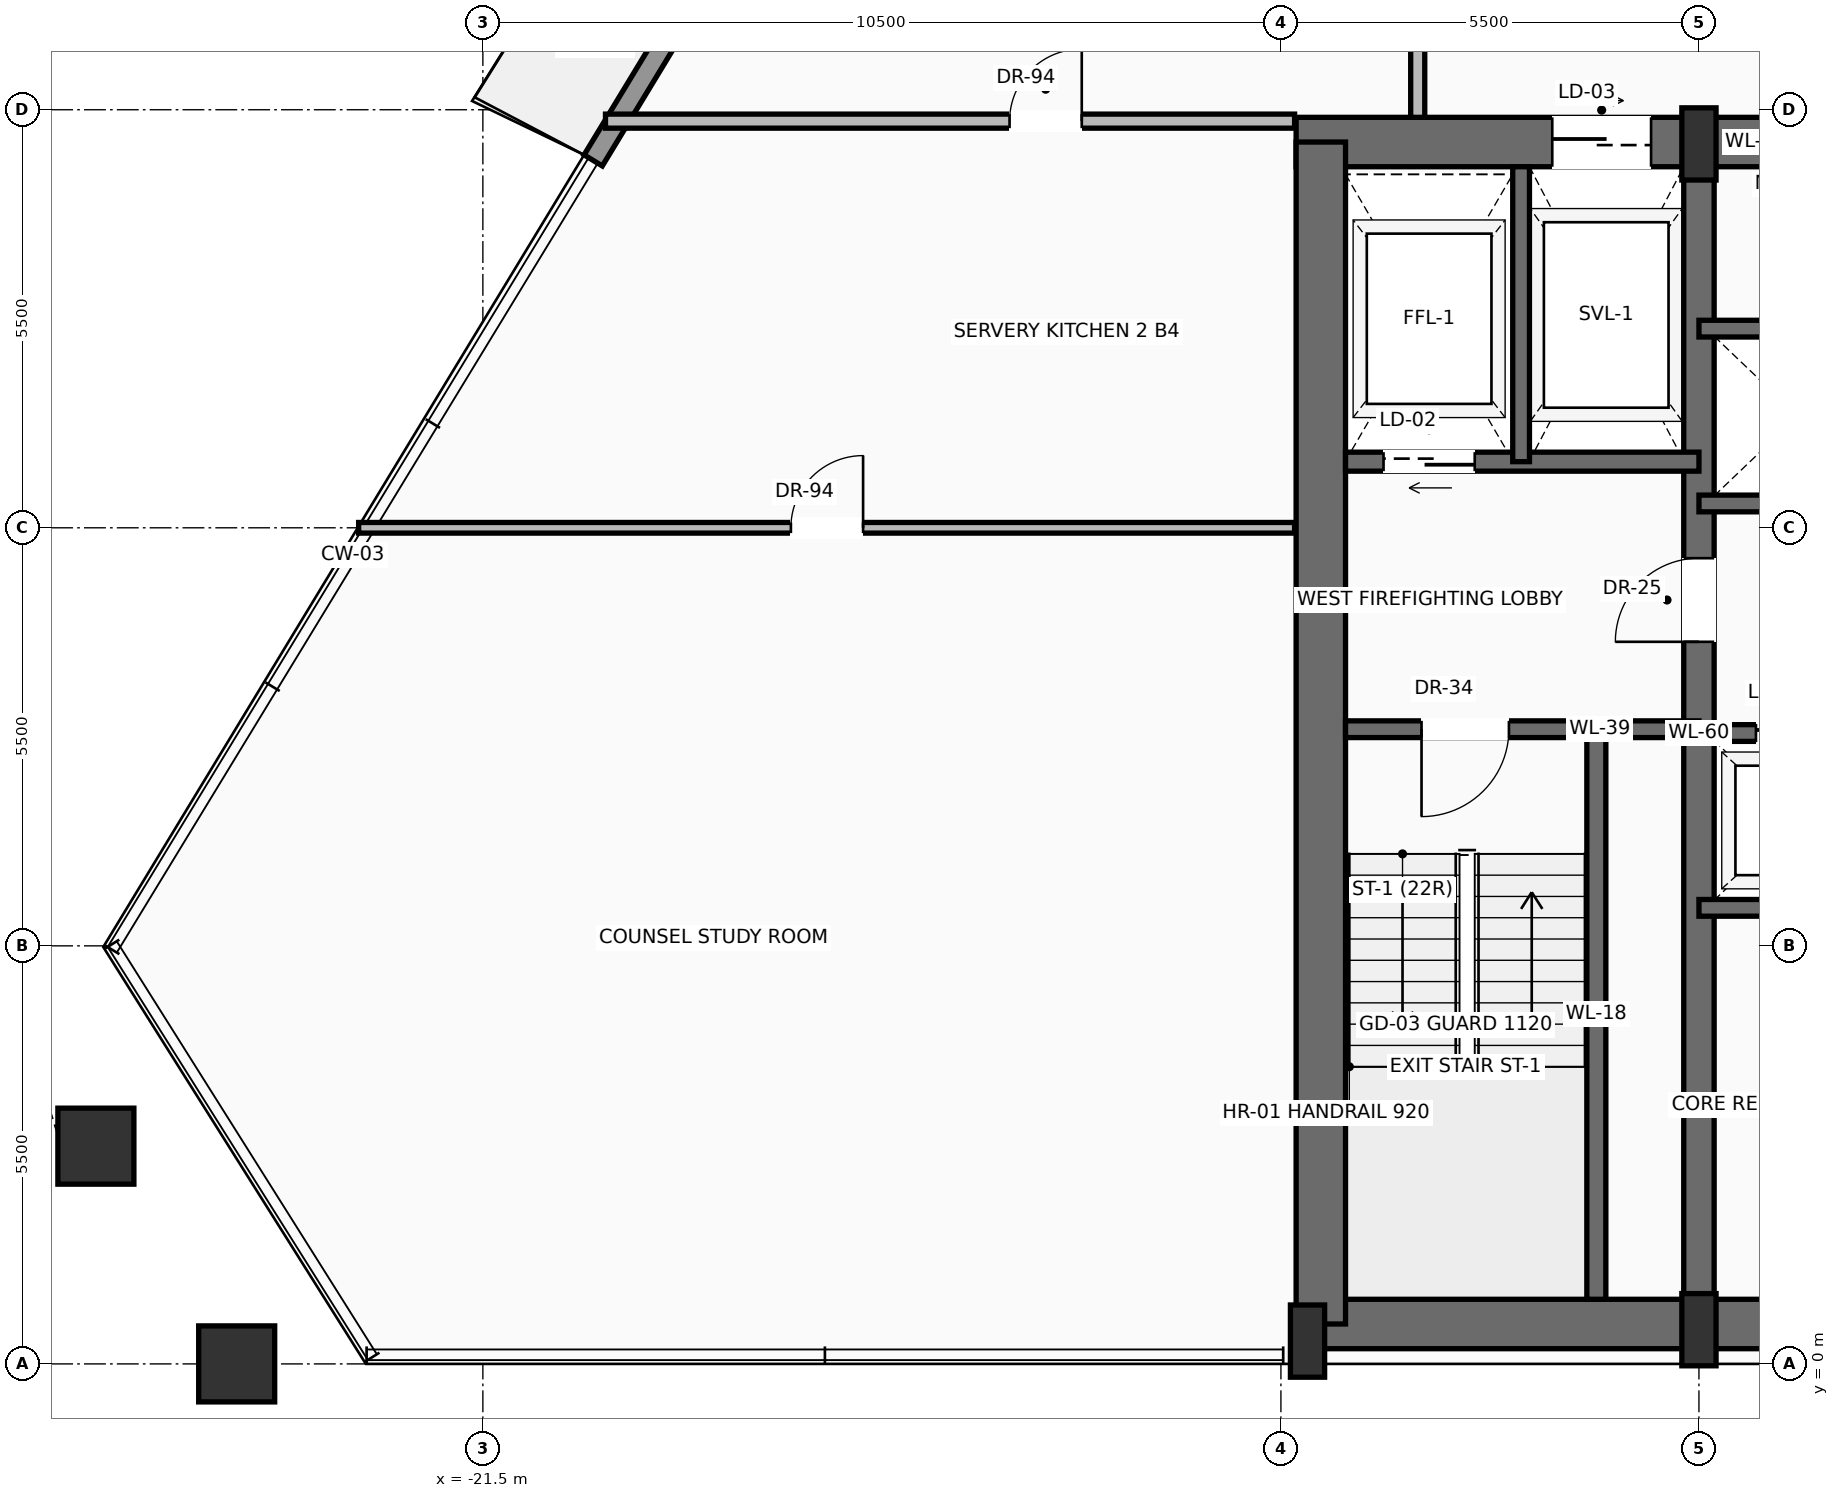
"""IFC4 building model, lengths in metres.
Left out: names, types, materials, properties, quantities, classifications, styles, units other than length and angle.
Written with IfcOpenShell. Run it as: python <this file> out.ifc"""

import sys

from ifc_helpers import new_model, si_unit, direction, frame, frame_2d, origin, origin_2d, place, context, subcontext, project, spatial, rectangle, hollow_rectangle, extrude, source, transform, mapped, element, fill, save


model = new_model("IFC4")
c1 = context("Model", 3, precision=1e-05, world=origin(), true_north=direction((0.0, 1.0)))
c2 = subcontext(c1, "Body", "Model", "MODEL_VIEW")
j1 = project(units=[si_unit("LENGTHUNIT", "METRE"), si_unit("PLANEANGLEUNIT", "RADIAN")], contexts=[c1])
p1 = place(None, origin())
s1 = spatial("IfcSite", under=j1, at=p1, CompositionType="ELEMENT")
p2 = place(p1, origin())
s2 = spatial("IfcBuilding", under=s1, at=p2, CompositionType="ELEMENT")
p3 = place(p2, frame((0.0, 0.0, 208.0)))
s3 = spatial("IfcBuildingStorey", under=s2, at=p3, CompositionType="ELEMENT", Elevation=208.0)
p4 = place(p3, frame((-10.65, 0.525, 0.0), z_axis=(0.0, 0.0, 1.0), x_axis=(1.0, 0.0, 0.0)))
e1 = element("IfcWall", 1, at=p4, inside=s3, PredefinedType="SHEAR", context=c2, shape_type="SweptSolid", body=[
    extrude(rectangle(XDim=21.3, YDim=0.65, at=frame_2d((10.65, 0.0))), origin(), (0.0, 0.0, 1.0), 3.47),
])
p5 = place(p3, frame((-10.8, 16.075, 0.0), z_axis=(0.0, 0.0, 1.0), x_axis=(1.0, 0.0, 0.0)))
e2 = element("IfcWall", 2, at=p5, inside=s3, PredefinedType="SHEAR", context=c2, shape_type="SweptSolid", body=[
    extrude(rectangle(XDim=21.6, YDim=0.65, at=frame_2d((10.8, 0.0))), origin(), (0.0, 0.0, 1.0), 3.47),
])
p6 = place(p5, frame((3.37, 0.0, 0.0)))
e3 = element("IfcOpeningElement", 3, at=p6, cuts=e2, PredefinedType="OPENING", context=c2, shape_type="SweptSolid", body=[
    extrude(rectangle(XDim=1.3, YDim=2.3, at=frame_2d((0.65, 1.15))), frame((0.0, 0.335, 0.0), z_axis=(0.0, -1.0, 0.0), x_axis=(1.0, 0.0, 0.0)), (0.0, 0.0, 1.0), 0.67),
])
p7 = place(p5, frame((9.8, 0.0, 0.0)))
e4 = element("IfcOpeningElement", 4, at=p7, cuts=e2, PredefinedType="OPENING", context=c2, shape_type="SweptSolid", body=[
    extrude(rectangle(XDim=2.0, YDim=2.4, at=frame_2d((1.0, 1.2))), frame((0.0, 0.335, 0.0), z_axis=(0.0, -1.0, 0.0), x_axis=(1.0, 0.0, 0.0)), (0.0, 0.0, 1.0), 0.67),
])
p8 = place(p3, frame((-10.475, 0.525, 0.0), z_axis=(0.0, 0.0, 1.0), x_axis=(0.0, 1.0, 0.0)))
e5 = element("IfcWall", 5, at=p8, inside=s3, PredefinedType="SHEAR", context=c2, shape_type="SweptSolid", body=[
    extrude(rectangle(XDim=15.55, YDim=0.65, at=frame_2d((7.775, 0.0))), origin(), (0.0, 0.0, 1.0), 3.47),
])
p9 = place(p3, frame((-5.5, 0.525, 0.0), z_axis=(0.0, 0.0, 1.0), x_axis=(0.0, 1.0, 0.0)))
e6 = element("IfcWall", 6, at=p9, inside=s3, PredefinedType="SHEAR", context=c2, shape_type="SweptSolid", body=[
    extrude(rectangle(XDim=15.55, YDim=0.4, at=frame_2d((7.775, 0.0))), origin(), (0.0, 0.0, 1.0), 3.47),
])
p10 = place(p9, frame((8.975, 0.0, 0.0)))
e7 = element("IfcOpeningElement", 7, at=p10, cuts=e6, PredefinedType="OPENING", context=c2, shape_type="SweptSolid", body=[
    extrude(rectangle(XDim=1.1, YDim=2.2, at=frame_2d((0.55, 1.1))), frame((0.0, 0.21, 0.0), z_axis=(0.0, -1.0, 0.0), x_axis=(1.0, 0.0, 0.0)), (0.0, 0.0, 1.0), 0.42),
])
m1 = source(origin(), c2, "Body", "SweptSolid", [
    extrude(rectangle(XDim=0.45, YDim=0.95, at=origin_2d()), origin(), (0.0, 0.0, 1.0), 3.7),
])
for number, where, z_axis, x_axis in (
    (8, (-10.65, 0.3, 0.0), (0.0, 0.0, 1.0), (1.0, 0.0, 0.0)),
    (9, (-5.5, 0.45, 0.0), (0.0, 0.0, 1.0), (1.0, 0.0, 0.0)),
    (10, (-5.5, 16.05, 0.0), (0.0, 0.0, 1.0), (1.0, 0.0, 0.0)),
):
    element("IfcColumn", number, at=place(p3, frame(where, z_axis=z_axis, x_axis=x_axis)), inside=s3, PredefinedType="PILASTER", context=c2, shape_type="MappedRepresentation", body=[
        mapped(m1, transform((0.0, 0.0, 0.0), scale=1.0)),
    ])
m2 = source(origin(), c2, "Body", "SweptSolid", [
    extrude(hollow_rectangle(XDim=1.0, YDim=1.0, WallThickness=0.05, at=origin_2d()), origin(), (0.0, 0.0, 1.0), 3.691),
])
p11 = place(p3, frame((-24.739, 0.0, 0.004), z_axis=(-0.006481774014, 0.0, 0.999978993082), x_axis=(0.0, -1.0, 0.0)))
e11 = element("IfcColumn", 11, at=p11, inside=s3, PredefinedType="COLUMN", context=c2, shape_type="MappedRepresentation", body=[
    mapped(m2, transform((0.0, 0.0, 0.0), scale=1.0)),
])
m3 = source(origin(), c2, "Body", "SweptSolid", [
    extrude(hollow_rectangle(XDim=1.0, YDim=1.0, WallThickness=0.05, at=origin_2d()), origin(), (0.0, 0.0, 1.0), 3.692),
])
p12 = place(p3, frame((-26.592, 2.865, 0.004), z_axis=(0.005951713196, -0.017921269733, 0.999821686703), x_axis=(0.949032912976, 0.315176982169, 0.0)))
e12 = element("IfcColumn", 12, at=p12, inside=s3, PredefinedType="COLUMN", context=c2, shape_type="MappedRepresentation", body=[
    mapped(m3, transform((0.0, 0.0, 0.0), scale=1.0)),
])
p13 = place(p3, frame((-20.048, 15.833, 0.0), z_axis=(0.0, 0.0, 1.0), x_axis=(0.518922930311, 0.854821029455, 0.0)))
e13 = element("IfcWall", 13, at=p13, inside=s3, PredefinedType="SOLIDWALL", context=c2, shape_type="SweptSolid", body=[
    extrude(rectangle(XDim=19.158, YDim=0.28, at=frame_2d((9.579, 0.0))), origin(), (0.0, 0.0, 1.0), 3.05),
])
p14 = place(p13, frame((4.598, 0.0, 0.0)))
e14 = element("IfcOpeningElement", 14, at=p14, cuts=e13, PredefinedType="OPENING", context=c2, shape_type="SweptSolid", body=[
    extrude(rectangle(XDim=1.6, YDim=2.35, at=frame_2d((0.8, 1.175))), frame((0.0, 0.15, 0.0), z_axis=(0.0, -1.0, 0.0), x_axis=(1.0, 0.0, 0.0)), (0.0, 0.0, 1.0), 0.3),
])
p15 = place(p13, frame((13.027, 0.0, 0.9)))
e15 = element("IfcOpeningElement", 15, at=p15, cuts=e13, PredefinedType="OPENING", context=c2, shape_type="SweptSolid", body=[
    extrude(rectangle(XDim=1.55, YDim=1.85, at=frame_2d((0.775, 0.925))), frame((0.0, 0.15, 0.0), z_axis=(0.0, -1.0, 0.0), x_axis=(1.0, 0.0, 0.0)), (0.0, 0.0, 1.0), 0.3),
])
p16 = place(p3, frame((-6.85, 0.85, 0.0), z_axis=(0.0, 0.0, 1.0), x_axis=(0.0, 1.0, 0.0)))
e16 = element("IfcWall", 16, at=p16, inside=s3, PredefinedType="SOLIDWALL", context=c2, shape_type="SweptSolid", body=[
    extrude(rectangle(XDim=7.5, YDim=0.25, at=frame_2d((3.75, 0.0))), origin(), (0.0, 0.0, 1.0), 3.47),
])
p17 = place(p3, frame((-5.5, 8.35, 0.0), z_axis=(0.0, 0.0, 1.0), x_axis=(-1.0, 0.0, 0.0)))
e17 = element("IfcWall", 17, at=p17, inside=s3, PredefinedType="SOLIDWALL", context=c2, shape_type="SweptSolid", body=[
    extrude(rectangle(XDim=4.65, YDim=0.22, at=frame_2d((2.325, 0.0))), origin(), (0.0, 0.0, 1.0), 3.47),
])
p18 = place(p17, frame((2.5, 0.0, 0.0)))
e18 = element("IfcOpeningElement", 18, at=p18, cuts=e17, PredefinedType="OPENING", context=c2, shape_type="SweptSolid", body=[
    extrude(rectangle(XDim=1.15, YDim=2.2, at=frame_2d((0.575, 1.1))), frame((0.0, 0.12, 0.0), z_axis=(0.0, -1.0, 0.0), x_axis=(1.0, 0.0, 0.0)), (0.0, 0.0, 1.0), 0.24),
])
p19 = place(p3, frame((-5.5, 11.87, 0.0), z_axis=(0.0, 0.0, 1.0), x_axis=(-1.0, 0.0, 0.0)))
e19 = element("IfcWall", 19, at=p19, inside=s3, PredefinedType="SOLIDWALL", context=c2, shape_type="SweptSolid", body=[
    extrude(rectangle(XDim=4.65, YDim=0.25, at=frame_2d((2.325, 0.0))), origin(), (0.0, 0.0, 1.0), 3.47),
])
p20 = place(p19, frame((2.95, 0.0, 0.0)))
e20 = element("IfcOpeningElement", 20, at=p20, cuts=e19, PredefinedType="OPENING", context=c2, shape_type="SweptSolid", body=[
    extrude(rectangle(XDim=1.2, YDim=2.25, at=frame_2d((0.6, 1.125))), frame((0.0, 0.135, 0.0), z_axis=(0.0, -1.0, 0.0), x_axis=(1.0, 0.0, 0.0)), (0.0, 0.0, 1.0), 0.27),
])
p21 = place(p3, frame((-7.84, 11.87, 0.0), z_axis=(0.0, 0.0, 1.0), x_axis=(0.0, 1.0, 0.0)))
e21 = element("IfcWall", 21, at=p21, inside=s3, PredefinedType="SOLIDWALL", context=c2, shape_type="SweptSolid", body=[
    extrude(rectangle(XDim=3.88, YDim=0.22, at=frame_2d((1.94, 0.0))), origin(), (0.0, 0.0, 1.0), 3.47),
])
p22 = place(p3, frame((-5.5, 6.0, 0.0), z_axis=(0.0, 0.0, 1.0), x_axis=(1.0, 0.0, 0.0)))
e22 = element("IfcWall", 22, at=p22, inside=s3, PredefinedType="SOLIDWALL", context=c2, shape_type="SweptSolid", body=[
    extrude(rectangle(XDim=7.32, YDim=0.22, at=frame_2d((3.66, 0.0))), origin(), (0.0, 0.0, 1.0), 3.47),
])
p23 = place(p3, frame((-5.5, 8.3, 0.0), z_axis=(0.0, 0.0, 1.0), x_axis=(1.0, 0.0, 0.0)))
e23 = element("IfcWall", 23, at=p23, inside=s3, PredefinedType="SOLIDWALL", context=c2, shape_type="SweptSolid", body=[
    extrude(rectangle(XDim=7.32, YDim=0.22, at=frame_2d((3.66, 0.0))), origin(), (0.0, 0.0, 1.0), 3.47),
])
p24 = place(p23, frame((0.75, 0.0, 0.0)))
e24 = element("IfcOpeningElement", 24, at=p24, cuts=e23, PredefinedType="OPENING", context=c2, shape_type="SweptSolid", body=[
    extrude(rectangle(XDim=1.1, YDim=2.2, at=frame_2d((0.55, 1.1))), frame((0.0, 0.12, 0.0), z_axis=(0.0, -1.0, 0.0), x_axis=(1.0, 0.0, 0.0)), (0.0, 0.0, 1.0), 0.24),
])
p25 = place(p23, frame((3.15, 0.0, 0.0)))
e25 = element("IfcOpeningElement", 25, at=p25, cuts=e23, PredefinedType="OPENING", context=c2, shape_type="SweptSolid", body=[
    extrude(rectangle(XDim=1.1, YDim=2.2, at=frame_2d((0.55, 1.1))), frame((0.0, 0.12, 0.0), z_axis=(0.0, -1.0, 0.0), x_axis=(1.0, 0.0, 0.0)), (0.0, 0.0, 1.0), 0.24),
])
p26 = place(p23, frame((5.55, 0.0, 0.0)))
e26 = element("IfcOpeningElement", 26, at=p26, cuts=e23, PredefinedType="OPENING", context=c2, shape_type="SweptSolid", body=[
    extrude(rectangle(XDim=1.1, YDim=2.2, at=frame_2d((0.55, 1.1))), frame((0.0, 0.12, 0.0), z_axis=(0.0, -1.0, 0.0), x_axis=(1.0, 0.0, 0.0)), (0.0, 0.0, 1.0), 0.24),
])
for number, where, z_axis, x_axis in (
    (27, (-5.5, 11.32, 0.0), (0.0, 0.0, 1.0), (1.0, 0.0, 0.0)),
    (28, (-5.5, 13.62, 0.0), (0.0, 0.0, 1.0), (1.0, 0.0, 0.0)),
):
    element("IfcWall", number, at=place(p3, frame(where, z_axis=z_axis, x_axis=x_axis)), inside=s3, PredefinedType="SOLIDWALL", context=c2, shape_type="SweptSolid", body=[
        extrude(rectangle(XDim=7.32, YDim=0.22, at=frame_2d((3.66, 0.0))), origin(), (0.0, 0.0, 1.0), 3.47),
    ])
p27 = place(p3, frame((-9.2, 16.4, 0.0), z_axis=(0.0, 0.0, 1.0), x_axis=(0.0, 1.0, 0.0)))
e29 = element("IfcWall", 29, at=p27, inside=s3, PredefinedType="PARTITIONING", context=c2, shape_type="SweptSolid", body=[
    extrude(rectangle(XDim=7.4, YDim=0.185, at=frame_2d((3.7, 0.0))), origin(), (0.0, 0.0, 1.0), 3.462),
])
p28 = place(p27, frame((2.889, 0.0, 0.0)))
e30 = element("IfcOpeningElement", 30, at=p28, cuts=e29, PredefinedType="OPENING", context=c2, shape_type="SweptSolid", body=[
    extrude(rectangle(XDim=0.95, YDim=2.2, at=frame_2d((0.475, 1.1))), frame((0.0, 0.103, 0.0), z_axis=(0.0, -1.0, 0.0), x_axis=(1.0, 0.0, 0.0)), (0.0, 0.0, 1.0), 0.205),
])
p29 = place(p3, frame((-19.887, 16.35, 0.0), z_axis=(0.0, 0.0, 1.0), x_axis=(1.0, 0.0, 0.0)))
e31 = element("IfcWall", 31, at=p29, inside=s3, PredefinedType="PARTITIONING", context=c2, shape_type="SweptSolid", body=[
    extrude(rectangle(XDim=9.067, YDim=0.185, at=frame_2d((4.533, 0.0))), origin(), (0.0, 0.0, 1.0), 3.462),
])
p30 = place(p29, frame((5.316, 0.0, 0.0)))
e32 = element("IfcOpeningElement", 32, at=p30, cuts=e31, PredefinedType="OPENING", context=c2, shape_type="SweptSolid", body=[
    extrude(rectangle(XDim=0.95, YDim=2.2, at=frame_2d((0.475, 1.1))), frame((0.0, 0.103, 0.0), z_axis=(0.0, -1.0, 0.0), x_axis=(1.0, 0.0, 0.0)), (0.0, 0.0, 1.0), 0.205),
])
p31 = place(p3, frame((-23.135, 11.0, 0.0), z_axis=(0.0, 0.0, 1.0), x_axis=(1.0, 0.0, 0.0)))
e33 = element("IfcWall", 33, at=p31, inside=s3, PredefinedType="PARTITIONING", context=c2, shape_type="SweptSolid", body=[
    extrude(rectangle(XDim=12.314, YDim=0.14, at=frame_2d((6.157, 0.0))), origin(), (0.0, 0.0, 1.0), 3.462),
])
p32 = place(p31, frame((5.687, 0.0, 0.0)))
e34 = element("IfcOpeningElement", 34, at=p32, cuts=e33, PredefinedType="OPENING", context=c2, shape_type="SweptSolid", body=[
    extrude(rectangle(XDim=0.95, YDim=2.2, at=frame_2d((0.475, 1.1))), frame((0.0, 0.08, 0.0), z_axis=(0.0, -1.0, 0.0), x_axis=(1.0, 0.0, 0.0)), (0.0, 0.0, 1.0), 0.16),
])
m4 = source(origin(), c2, "Body", "SweptSolid", [
    extrude(rectangle(XDim=1.15, YDim=2.2, at=frame_2d((0.575, 1.1))), frame((0.0, 0.025, 0.0), z_axis=(0.0, -1.0, 0.0), x_axis=(1.0, 0.0, 0.0)), (0.0, 0.0, 1.0), 0.05),
])
p33 = place(p18, origin())
e35 = element("IfcDoor", 35, at=p33, inside=s3, OperationType="SINGLE_SWING_RIGHT", PredefinedType="DOOR", context=c2, shape_type="MappedRepresentation", body=[
    mapped(m4, transform((0.0, 0.0, 0.0), scale=1.0)),
])
fill(e18, e35)
m5 = source(origin(), c2, "Body", "SweptSolid", [
    extrude(rectangle(XDim=1.1, YDim=2.2, at=frame_2d((0.55, 1.1))), frame((0.0, 0.025, 0.0), z_axis=(0.0, -1.0, 0.0), x_axis=(1.0, 0.0, 0.0)), (0.0, 0.0, 1.0), 0.05),
])
p34 = place(p10, origin())
e36 = element("IfcDoor", 36, at=p34, inside=s3, OperationType="SINGLE_SWING_LEFT", PredefinedType="DOOR", context=c2, shape_type="MappedRepresentation", body=[
    mapped(m5, transform((0.0, 0.0, 0.0), scale=1.0)),
])
fill(e7, e36)
m6 = source(origin(), c2, "Body", "SweptSolid", [
    extrude(rectangle(XDim=1.2, YDim=2.25, at=frame_2d((0.6, 1.125))), frame((0.0, 0.025, 0.0), z_axis=(0.0, -1.0, 0.0), x_axis=(1.0, 0.0, 0.0)), (0.0, 0.0, 1.0), 0.05),
])
p35 = place(p20, origin())
e37 = element("IfcDoor", 37, at=p35, inside=s3, OperationType="SLIDING_TO_LEFT", PredefinedType="DOOR", context=c2, shape_type="MappedRepresentation", body=[
    mapped(m6, transform((0.0, 0.0, 0.0), scale=1.0)),
])
fill(e20, e37)
m7 = source(origin(), c2, "Body", "SweptSolid", [
    extrude(rectangle(XDim=1.3, YDim=2.3, at=frame_2d((0.65, 1.15))), frame((0.0, 0.025, 0.0), z_axis=(0.0, -1.0, 0.0), x_axis=(1.0, 0.0, 0.0)), (0.0, 0.0, 1.0), 0.05),
])
p36 = place(p6, origin())
e38 = element("IfcDoor", 38, at=p36, inside=s3, OperationType="SLIDING_TO_RIGHT", PredefinedType="DOOR", context=c2, shape_type="MappedRepresentation", body=[
    mapped(m7, transform((0.0, 0.0, 0.0), scale=1.0)),
])
fill(e3, e38)
m8 = source(origin(), c2, "Body", "SweptSolid", [
    extrude(rectangle(XDim=1.1, YDim=2.2, at=frame_2d((0.55, 1.1))), frame((0.0, 0.025, 0.0), z_axis=(0.0, -1.0, 0.0), x_axis=(1.0, 0.0, 0.0)), (0.0, 0.0, 1.0), 0.05),
])
p37 = place(p24, origin())
e39 = element("IfcDoor", 39, at=p37, inside=s3, OperationType="SLIDING_TO_LEFT", PredefinedType="DOOR", context=c2, shape_type="MappedRepresentation", body=[
    mapped(m8, transform((0.0, 0.0, 0.0), scale=1.0)),
])
fill(e24, e39)
m9 = source(origin(), c2, "Body", "SweptSolid", [
    extrude(rectangle(XDim=0.95, YDim=2.2, at=frame_2d((0.475, 1.1))), frame((0.0, 0.025, 0.0), z_axis=(0.0, -1.0, 0.0), x_axis=(1.0, 0.0, 0.0)), (0.0, 0.0, 1.0), 0.05),
])
p38 = place(p30, origin())
e40 = element("IfcDoor", 40, at=p38, inside=s3, OperationType="SINGLE_SWING_RIGHT", PredefinedType="DOOR", context=c2, shape_type="MappedRepresentation", body=[
    mapped(m9, transform((0.0, 0.0, 0.0), scale=1.0)),
])
fill(e32, e40)
p39 = place(p32, origin())
e41 = element("IfcDoor", 41, at=p39, inside=s3, OperationType="SINGLE_SWING_RIGHT", PredefinedType="DOOR", context=c2, shape_type="MappedRepresentation", body=[
    mapped(m9, transform((0.0, 0.0, 0.0), scale=1.0)),
])
fill(e34, e41)
save(model, sys.argv[1])
